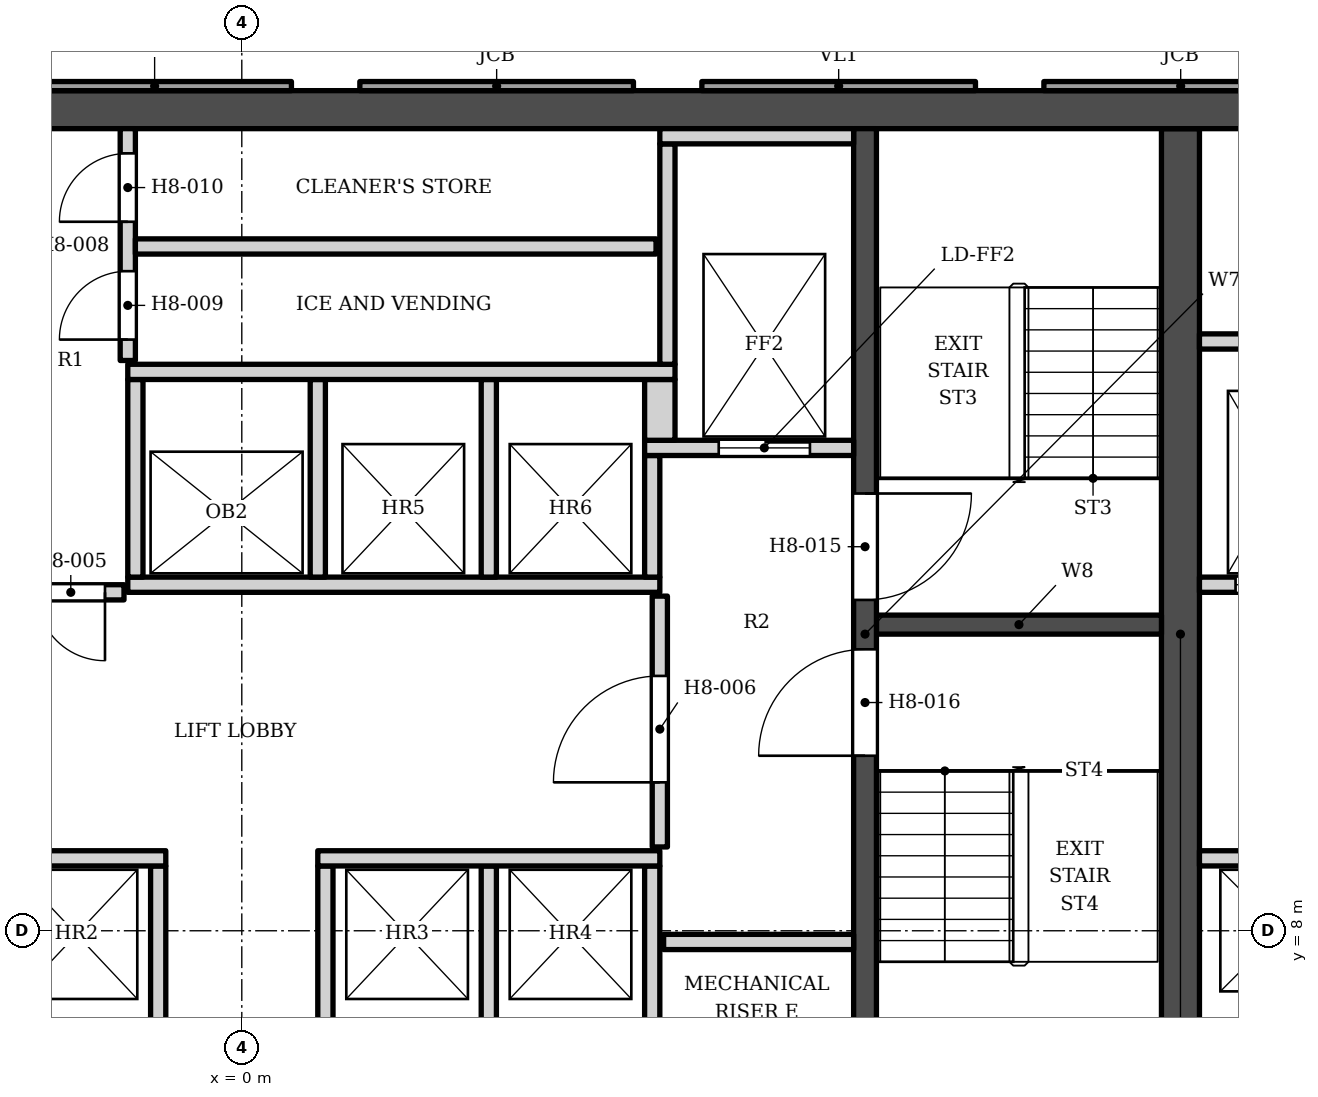
"""IFC4 building model, lengths in metres.
Left out: names, types, materials, properties, quantities, classifications, styles, units other than length and angle.
Written with IfcOpenShell. Run it as: python <this file> out.ifc"""

import sys

from ifc_helpers import new_model, si_unit, direction, frame, frame_2d, origin, place, context, subcontext, project, spatial, polyline, rectangle, outline, extrude, element, fill, save


model = new_model("IFC4")
c1 = context("Model", 3, precision=1e-05, world=origin(), true_north=direction((0.0, 1.0)))
c2 = subcontext(c1, "Body", "Model", "MODEL_VIEW")
j1 = project(units=[si_unit("LENGTHUNIT", "METRE"), si_unit("PLANEANGLEUNIT", "RADIAN")], contexts=[c1])
p1 = place(None, origin())
s1 = spatial("IfcSite", under=j1, at=p1, CompositionType="ELEMENT")
p2 = place(p1, origin())
s2 = spatial("IfcBuilding", under=s1, at=p2, CompositionType="ELEMENT")
p3 = place(p2, frame((0.0, 0.0, 122.4)))
s3 = spatial("IfcBuildingStorey", under=s2, at=p3, CompositionType="ELEMENT", Elevation=122.4)
p4 = place(p3, frame((-16.9, 18.802, 0.0), z_axis=(0.0, 0.0, 1.0), x_axis=(1.0, 0.0, 0.0)))
e1 = element("IfcWall", 1, at=p4, inside=s3, PredefinedType="SHEAR", context=c2, shape_type="SweptSolid", body=[
    extrude(rectangle(XDim=33.8, YDim=0.5, at=frame_2d((16.9, 0.0))), origin(), (0.0, 0.0, 1.0), 3.4),
])
p5 = place(p3, frame((12.35, 5.253, 0.0), z_axis=(0.0, 0.0, 1.0), x_axis=(0.0, 1.0, 0.0)))
e2 = element("IfcWall", 2, at=p5, inside=s3, PredefinedType="SHEAR", context=c2, shape_type="SweptSolid", body=[
    extrude(rectangle(XDim=13.3, YDim=0.5, at=frame_2d((6.65, 0.0))), origin(), (0.0, 0.0, 1.0), 3.4),
])
p6 = place(p3, frame((8.2, 5.253, 0.0), z_axis=(0.0, 0.0, 1.0), x_axis=(0.0, 1.0, 0.0)))
e3 = element("IfcWall", 3, at=p6, inside=s3, PredefinedType="SHEAR", context=c2, shape_type="SweptSolid", body=[
    extrude(rectangle(XDim=13.3, YDim=0.3, at=frame_2d((6.65, 0.0))), origin(), (0.0, 0.0, 1.0), 3.4),
])
p7 = place(p6, frame((7.1, 0.0, 0.0)))
e4 = element("IfcOpeningElement", 4, at=p7, cuts=e3, PredefinedType="OPENING", context=c2, shape_type="SweptSolid", body=[
    extrude(rectangle(XDim=1.4, YDim=2.1, at=frame_2d((0.7, 1.05))), frame((0.0, 0.16, 0.0), z_axis=(0.0, -1.0, 0.0), x_axis=(1.0, 0.0, 0.0)), (0.0, 0.0, 1.0), 0.32),
])
p8 = place(p6, frame((5.05, 0.0, 0.0)))
e5 = element("IfcOpeningElement", 5, at=p8, cuts=e3, PredefinedType="OPENING", context=c2, shape_type="SweptSolid", body=[
    extrude(rectangle(XDim=1.4, YDim=2.1, at=frame_2d((0.7, 1.05))), frame((0.0, 0.16, 0.0), z_axis=(0.0, -1.0, 0.0), x_axis=(1.0, 0.0, 0.0)), (0.0, 0.0, 1.0), 0.32),
])
p9 = place(p3, frame((8.35, 12.028, 0.0), z_axis=(0.0, 0.0, 1.0), x_axis=(1.0, 0.0, 0.0)))
e6 = element("IfcWall", 6, at=p9, inside=s3, PredefinedType="SHEAR", context=c2, shape_type="SweptSolid", body=[
    extrude(rectangle(XDim=3.75, YDim=0.25, at=frame_2d((1.875, 0.0))), origin(), (0.0, 0.0, 1.0), 3.4),
])
p10 = place(p3, origin())
e7 = element("IfcWall", 7, at=p10, inside=s3, PredefinedType="SOLIDWALL", context=c2, shape_type="SweptSolid", body=[
    extrude(outline(polyline([(10.553, 19.173), (10.553, 19.052), (14.153, 19.052), (14.153, 19.173), (10.553, 19.173)])), origin(), (0.0, 0.0, 1.0), 2.65),
])
p11 = place(p3, origin())
e8 = element("IfcWall", 8, at=p11, inside=s3, PredefinedType="ELEMENTEDWALL", context=c2, shape_type="SweptSolid", body=[
    extrude(outline(polyline([(6.053, 19.173), (6.053, 19.052), (9.653, 19.052), (9.653, 19.173), (6.053, 19.173)])), origin(), (0.0, 0.0, 1.0), 2.65),
])
p12 = place(p3, origin())
e9 = element("IfcWall", 9, at=p12, inside=s3, PredefinedType="SOLIDWALL", context=c2, shape_type="SweptSolid", body=[
    extrude(outline(polyline([(1.553, 19.173), (1.553, 19.052), (5.153, 19.052), (5.153, 19.173), (1.553, 19.173)])), origin(), (0.0, 0.0, 1.0), 2.65),
])
p13 = place(p3, origin())
e10 = element("IfcWall", 10, at=p13, inside=s3, PredefinedType="ELEMENTEDWALL", context=c2, shape_type="SweptSolid", body=[
    extrude(outline(polyline([(-2.947, 19.173), (-2.947, 19.052), (0.653, 19.052), (0.653, 19.173), (-2.947, 19.173)])), origin(), (0.0, 0.0, 1.0), 2.65),
])
for number, where, z_axis, x_axis in (
    (11, (-1.1, 6.353, 0.0), (0.0, 0.0, 1.0), (0.0, 1.0, 0.0)),
    (12, (1.1, 6.353, 0.0), (0.0, 0.0, 1.0), (0.0, 1.0, 0.0)),
    (13, (3.25, 6.353, 0.0), (0.0, 0.0, 1.0), (0.0, 1.0, 0.0)),
    (14, (5.4, 6.353, 0.0), (0.0, 0.0, 1.0), (0.0, 1.0, 0.0)),
    (15, (5.55, 7.853, 0.0), (0.0, 0.0, 1.0), (1.0, 0.0, 0.0)),
):
    element("IfcWall", number, at=place(p3, frame(where, z_axis=z_axis, x_axis=x_axis)), inside=s3, PredefinedType="SOLIDWALL", context=c2, shape_type="SweptSolid", body=[
        extrude(rectangle(XDim=2.5, YDim=0.2, at=frame_2d((1.25, 0.0))), origin(), (0.0, 0.0, 1.0), 3.23),
    ])
for number, where, z_axis, x_axis in (
    (16, (-5.5, 8.953, 0.0), (0.0, 0.0, 1.0), (1.0, 0.0, 0.0)),
    (17, (1.0, 8.953, 0.0), (0.0, 0.0, 1.0), (1.0, 0.0, 0.0)),
):
    element("IfcWall", number, at=place(p3, frame(where, z_axis=z_axis, x_axis=x_axis)), inside=s3, PredefinedType="SOLIDWALL", context=c2, shape_type="SweptSolid", body=[
        extrude(rectangle(XDim=4.5, YDim=0.2, at=frame_2d((2.25, 0.0))), origin(), (0.0, 0.0, 1.0), 3.23),
    ])
p14 = place(p3, frame((12.6, 8.953, 0.0), z_axis=(0.0, 0.0, 1.0), x_axis=(1.0, 0.0, 0.0)))
e18 = element("IfcWall", 18, at=p14, inside=s3, PredefinedType="SOLIDWALL", context=c2, shape_type="SweptSolid", body=[
    extrude(rectangle(XDim=4.3, YDim=0.2, at=frame_2d((2.15, 0.0))), origin(), (0.0, 0.0, 1.0), 3.23),
])
p15 = place(p14, frame((0.525, 0.0, 0.0)))
e19 = element("IfcOpeningElement", 19, at=p15, cuts=e18, PredefinedType="OPENING", context=c2, shape_type="SweptSolid", body=[
    extrude(rectangle(XDim=1.1, YDim=2.1, at=frame_2d((0.55, 1.05))), frame((0.0, 0.11, 0.0), z_axis=(0.0, -1.0, 0.0), x_axis=(1.0, 0.0, 0.0)), (0.0, 0.0, 1.0), 0.22),
])
p16 = place(p14, frame((2.775, 0.0, 0.0)))
e20 = element("IfcOpeningElement", 20, at=p16, cuts=e18, PredefinedType="OPENING", context=c2, shape_type="SweptSolid", body=[
    extrude(rectangle(XDim=1.1, YDim=2.1, at=frame_2d((0.55, 1.05))), frame((0.0, 0.11, 0.0), z_axis=(0.0, -1.0, 0.0), x_axis=(1.0, 0.0, 0.0)), (0.0, 0.0, 1.0), 0.22),
])
p17 = place(p3, frame((5.5, 9.103, 0.0), z_axis=(0.0, 0.0, 1.0), x_axis=(0.0, 1.0, 0.0)))
e21 = element("IfcWall", 21, at=p17, inside=s3, PredefinedType="SOLIDWALL", context=c2, shape_type="SweptSolid", body=[
    extrude(rectangle(XDim=3.3, YDim=0.2, at=frame_2d((1.65, 0.0))), origin(), (0.0, 0.0, 1.0), 3.23),
])
p18 = place(p17, frame((0.85, 0.0, 0.0)))
e22 = element("IfcOpeningElement", 22, at=p18, cuts=e21, PredefinedType="OPENING", context=c2, shape_type="SweptSolid", body=[
    extrude(rectangle(XDim=1.4, YDim=2.1, at=frame_2d((0.7, 1.05))), frame((0.0, 0.11, 0.0), z_axis=(0.0, -1.0, 0.0), x_axis=(1.0, 0.0, 0.0)), (0.0, 0.0, 1.0), 0.22),
])
p19 = place(p3, frame((-2.95, 12.453, 0.0), z_axis=(0.0, 0.0, 1.0), x_axis=(1.0, 0.0, 0.0)))
e23 = element("IfcWall", 23, at=p19, inside=s3, PredefinedType="SOLIDWALL", context=c2, shape_type="SweptSolid", body=[
    extrude(rectangle(XDim=1.4, YDim=0.2, at=frame_2d((0.7, 0.0))), origin(), (0.0, 0.0, 1.0), 3.23),
])
p20 = place(p19, frame((0.25, 0.0, 0.0)))
e24 = element("IfcOpeningElement", 24, at=p20, cuts=e23, PredefinedType="OPENING", context=c2, shape_type="SweptSolid", body=[
    extrude(rectangle(XDim=0.9, YDim=2.1, at=frame_2d((0.45, 1.05))), frame((0.0, 0.11, 0.0), z_axis=(0.0, -1.0, 0.0), x_axis=(1.0, 0.0, 0.0)), (0.0, 0.0, 1.0), 0.22),
])
p21 = place(p3, frame((-1.5, 12.552, 0.0), z_axis=(0.0, 0.0, 1.0), x_axis=(1.0, 0.0, 0.0)))
e25 = element("IfcWall", 25, at=p21, inside=s3, PredefinedType="SOLIDWALL", context=c2, shape_type="SweptSolid", body=[
    extrude(rectangle(XDim=7.0, YDim=0.2, at=frame_2d((3.5, 0.0))), origin(), (0.0, 0.0, 1.0), 3.23),
])
p22 = place(p3, frame((12.6, 12.552, 0.0), z_axis=(0.0, 0.0, 1.0), x_axis=(1.0, 0.0, 0.0)))
e26 = element("IfcWall", 26, at=p22, inside=s3, PredefinedType="SOLIDWALL", context=c2, shape_type="SweptSolid", body=[
    extrude(rectangle(XDim=4.3, YDim=0.2, at=frame_2d((2.15, 0.0))), origin(), (0.0, 0.0, 1.0), 3.23),
])
p23 = place(p22, frame((0.475, 0.0, 0.0)))
e27 = element("IfcOpeningElement", 27, at=p23, cuts=e26, PredefinedType="OPENING", context=c2, shape_type="SweptSolid", body=[
    extrude(rectangle(XDim=1.2, YDim=2.1, at=frame_2d((0.6, 1.05))), frame((0.0, 0.11, 0.0), z_axis=(0.0, -1.0, 0.0), x_axis=(1.0, 0.0, 0.0)), (0.0, 0.0, 1.0), 0.22),
])
p24 = place(p22, frame((2.625, 0.0, 0.0)))
e28 = element("IfcOpeningElement", 28, at=p24, cuts=e26, PredefinedType="OPENING", context=c2, shape_type="SweptSolid", body=[
    extrude(rectangle(XDim=1.4, YDim=2.1, at=frame_2d((0.7, 1.05))), frame((0.0, 0.11, 0.0), z_axis=(0.0, -1.0, 0.0), x_axis=(1.0, 0.0, 0.0)), (0.0, 0.0, 1.0), 0.22),
])
for number, where, z_axis, x_axis in (
    (29, (-1.4, 12.653, 0.0), (0.0, 0.0, 1.0), (0.0, 1.0, 0.0)),
    (30, (1.0, 12.653, 0.0), (0.0, 0.0, 1.0), (0.0, 1.0, 0.0)),
    (31, (3.25, 12.653, 0.0), (0.0, 0.0, 1.0), (0.0, 1.0, 0.0)),
):
    element("IfcWall", number, at=place(p3, frame(where, z_axis=z_axis, x_axis=x_axis)), inside=s3, PredefinedType="SOLIDWALL", context=c2, shape_type="SweptSolid", body=[
        extrude(rectangle(XDim=2.6, YDim=0.2, at=frame_2d((1.3, 0.0))), origin(), (0.0, 0.0, 1.0), 3.23),
    ])
p25 = place(p3, frame((5.4, 12.653, 0.0), z_axis=(0.0, 0.0, 1.0), x_axis=(0.0, 1.0, 0.0)))
e32 = element("IfcWall", 32, at=p25, inside=s3, PredefinedType="SOLIDWALL", context=c2, shape_type="SweptSolid", body=[
    extrude(rectangle(XDim=1.6, YDim=0.2, at=frame_2d((0.8, 0.0))), origin(), (0.0, 0.0, 1.0), 3.23),
])
p26 = place(p3, frame((5.3, 14.353, 0.0), z_axis=(0.0, 0.0, 1.0), x_axis=(1.0, 0.0, 0.0)))
e33 = element("IfcWall", 33, at=p26, inside=s3, PredefinedType="SOLIDWALL", context=c2, shape_type="SweptSolid", body=[
    extrude(rectangle(XDim=2.75, YDim=0.2, at=frame_2d((1.375, 0.0))), origin(), (0.0, 0.0, 1.0), 3.23),
])
p27 = place(p26, frame((0.975, 0.0, 0.0)))
e34 = element("IfcOpeningElement", 34, at=p27, cuts=e33, PredefinedType="OPENING", context=c2, shape_type="SweptSolid", body=[
    extrude(rectangle(XDim=1.2, YDim=2.1, at=frame_2d((0.6, 1.05))), frame((0.0, 0.11, 0.0), z_axis=(0.0, -1.0, 0.0), x_axis=(1.0, 0.0, 0.0)), (0.0, 0.0, 1.0), 0.22),
])
p28 = place(p3, frame((5.5, 14.453, 0.0), z_axis=(0.0, 0.0, 1.0), x_axis=(0.0, 1.0, 0.0)))
e35 = element("IfcWall", 35, at=p28, inside=s3, PredefinedType="SOLIDWALL", context=c2, shape_type="SweptSolid", body=[
    extrude(rectangle(XDim=0.8, YDim=0.4, at=frame_2d((0.4, 0.0))), origin(), (0.0, 0.0, 1.0), 3.23),
])
p29 = place(p3, frame((-1.5, 15.353, 0.0), z_axis=(0.0, 0.0, 1.0), x_axis=(1.0, 0.0, 0.0)))
e36 = element("IfcWall", 36, at=p29, inside=s3, PredefinedType="SOLIDWALL", context=c2, shape_type="SweptSolid", body=[
    extrude(rectangle(XDim=7.2, YDim=0.2, at=frame_2d((3.6, 0.0))), origin(), (0.0, 0.0, 1.0), 3.23),
])
p30 = place(p3, frame((5.6, 15.453, 0.0), z_axis=(0.0, 0.0, 1.0), x_axis=(0.0, 1.0, 0.0)))
e37 = element("IfcWall", 37, at=p30, inside=s3, PredefinedType="SOLIDWALL", context=c2, shape_type="SweptSolid", body=[
    extrude(rectangle(XDim=2.9, YDim=0.2, at=frame_2d((1.45, 0.0))), origin(), (0.0, 0.0, 1.0), 3.23),
])
p31 = place(p3, frame((-1.5, 15.503, 0.0), z_axis=(0.0, 0.0, 1.0), x_axis=(0.0, 1.0, 0.0)))
e38 = element("IfcWall", 38, at=p31, inside=s3, PredefinedType="SOLIDWALL", context=c2, shape_type="SweptSolid", body=[
    extrude(rectangle(XDim=3.05, YDim=0.2, at=frame_2d((1.525, 0.0))), origin(), (0.0, 0.0, 1.0), 3.23),
])
p32 = place(p31, frame((0.275, 0.0, 0.0)))
e39 = element("IfcOpeningElement", 39, at=p32, cuts=e38, PredefinedType="OPENING", context=c2, shape_type="SweptSolid", body=[
    extrude(rectangle(XDim=0.9, YDim=2.1, at=frame_2d((0.45, 1.05))), frame((0.0, 0.11, 0.0), z_axis=(0.0, -1.0, 0.0), x_axis=(1.0, 0.0, 0.0)), (0.0, 0.0, 1.0), 0.22),
])
p33 = place(p31, frame((1.825, 0.0, 0.0)))
e40 = element("IfcOpeningElement", 40, at=p33, cuts=e38, PredefinedType="OPENING", context=c2, shape_type="SweptSolid", body=[
    extrude(rectangle(XDim=0.9, YDim=2.1, at=frame_2d((0.45, 1.05))), frame((0.0, 0.11, 0.0), z_axis=(0.0, -1.0, 0.0), x_axis=(1.0, 0.0, 0.0)), (0.0, 0.0, 1.0), 0.22),
])
p34 = place(p3, frame((12.6, 15.753, 0.0), z_axis=(0.0, 0.0, 1.0), x_axis=(1.0, 0.0, 0.0)))
e41 = element("IfcWall", 41, at=p34, inside=s3, PredefinedType="SOLIDWALL", context=c2, shape_type="SweptSolid", body=[
    extrude(rectangle(XDim=4.3, YDim=0.2, at=frame_2d((2.15, 0.0))), origin(), (0.0, 0.0, 1.0), 3.23),
])
p35 = place(p3, frame((-1.4, 17.003, 0.0), z_axis=(0.0, 0.0, 1.0), x_axis=(1.0, 0.0, 0.0)))
e42 = element("IfcWall", 42, at=p35, inside=s3, PredefinedType="SOLIDWALL", context=c2, shape_type="SweptSolid", body=[
    extrude(rectangle(XDim=6.85, YDim=0.2, at=frame_2d((3.425, 0.0))), origin(), (0.0, 0.0, 1.0), 3.23),
])
p36 = place(p3, frame((5.5, 18.453, 0.0), z_axis=(0.0, 0.0, 1.0), x_axis=(1.0, 0.0, 0.0)))
e43 = element("IfcWall", 43, at=p36, inside=s3, PredefinedType="SOLIDWALL", context=c2, shape_type="SweptSolid", body=[
    extrude(rectangle(XDim=2.55, YDim=0.2, at=frame_2d((1.275, 0.0))), origin(), (0.0, 0.0, 1.0), 3.23),
])
p37 = place(p27, origin())
e44 = element("IfcDoor", 44, at=p37, inside=s3, OperationType="DOUBLE_DOOR_SLIDING", PredefinedType="DOOR", context=c2, shape_type="SweptSolid", body=[
    extrude(rectangle(XDim=1.2, YDim=2.1, at=frame_2d((0.6, 1.05))), frame((0.0, 0.025, 0.0), z_axis=(0.0, -1.0, 0.0), x_axis=(1.0, 0.0, 0.0)), (0.0, 0.0, 1.0), 0.05),
])
fill(e34, e44)
p38 = place(p23, origin())
e45 = element("IfcDoor", 45, at=p38, inside=s3, OperationType="DOUBLE_DOOR_SLIDING", PredefinedType="DOOR", context=c2, shape_type="SweptSolid", body=[
    extrude(rectangle(XDim=1.2, YDim=2.1, at=frame_2d((0.6, 1.05))), frame((0.0, 0.025, 0.0), z_axis=(0.0, -1.0, 0.0), x_axis=(1.0, 0.0, 0.0)), (0.0, 0.0, 1.0), 0.05),
])
fill(e27, e45)
p39 = place(p7, origin())
e46 = element("IfcDoor", 46, at=p39, inside=s3, OperationType="SINGLE_SWING_RIGHT", PredefinedType="DOOR", context=c2, shape_type="SweptSolid", body=[
    extrude(rectangle(XDim=1.4, YDim=2.1, at=frame_2d((0.7, 1.05))), frame((0.0, 0.025, 0.0), z_axis=(0.0, -1.0, 0.0), x_axis=(1.0, 0.0, 0.0)), (0.0, 0.0, 1.0), 0.05),
])
fill(e4, e46)
p40 = place(p8, origin())
e47 = element("IfcDoor", 47, at=p40, inside=s3, OperationType="SINGLE_SWING_LEFT", PredefinedType="DOOR", context=c2, shape_type="SweptSolid", body=[
    extrude(rectangle(XDim=1.4, YDim=2.1, at=frame_2d((0.7, 1.05))), frame((0.0, 0.025, 0.0), z_axis=(0.0, -1.0, 0.0), x_axis=(1.0, 0.0, 0.0)), (0.0, 0.0, 1.0), 0.05),
])
fill(e5, e47)
p41 = place(p20, origin())
e48 = element("IfcDoor", 48, at=p41, inside=s3, OperationType="SINGLE_SWING_RIGHT", PredefinedType="DOOR", context=c2, shape_type="SweptSolid", body=[
    extrude(rectangle(XDim=0.9, YDim=2.1, at=frame_2d((0.45, 1.05))), frame((0.0, 0.025, 0.0), z_axis=(0.0, -1.0, 0.0), x_axis=(1.0, 0.0, 0.0)), (0.0, 0.0, 1.0), 0.05),
])
fill(e24, e48)
p42 = place(p18, origin())
e49 = element("IfcDoor", 49, at=p42, inside=s3, OperationType="SINGLE_SWING_LEFT", PredefinedType="DOOR", context=c2, shape_type="SweptSolid", body=[
    extrude(rectangle(XDim=1.4, YDim=2.1, at=frame_2d((0.7, 1.05))), frame((0.0, 0.025, 0.0), z_axis=(0.0, -1.0, 0.0), x_axis=(1.0, 0.0, 0.0)), (0.0, 0.0, 1.0), 0.05),
])
fill(e22, e49)
p43 = place(p32, origin())
e50 = element("IfcDoor", 50, at=p43, inside=s3, OperationType="SINGLE_SWING_LEFT", PredefinedType="DOOR", context=c2, shape_type="SweptSolid", body=[
    extrude(rectangle(XDim=0.9, YDim=2.1, at=frame_2d((0.45, 1.05))), frame((0.0, 0.025, 0.0), z_axis=(0.0, -1.0, 0.0), x_axis=(1.0, 0.0, 0.0)), (0.0, 0.0, 1.0), 0.05),
])
fill(e39, e50)
p44 = place(p33, origin())
e51 = element("IfcDoor", 51, at=p44, inside=s3, OperationType="SINGLE_SWING_LEFT", PredefinedType="DOOR", context=c2, shape_type="SweptSolid", body=[
    extrude(rectangle(XDim=0.9, YDim=2.1, at=frame_2d((0.45, 1.05))), frame((0.0, 0.025, 0.0), z_axis=(0.0, -1.0, 0.0), x_axis=(1.0, 0.0, 0.0)), (0.0, 0.0, 1.0), 0.05),
])
fill(e40, e51)
save(model, sys.argv[1])
